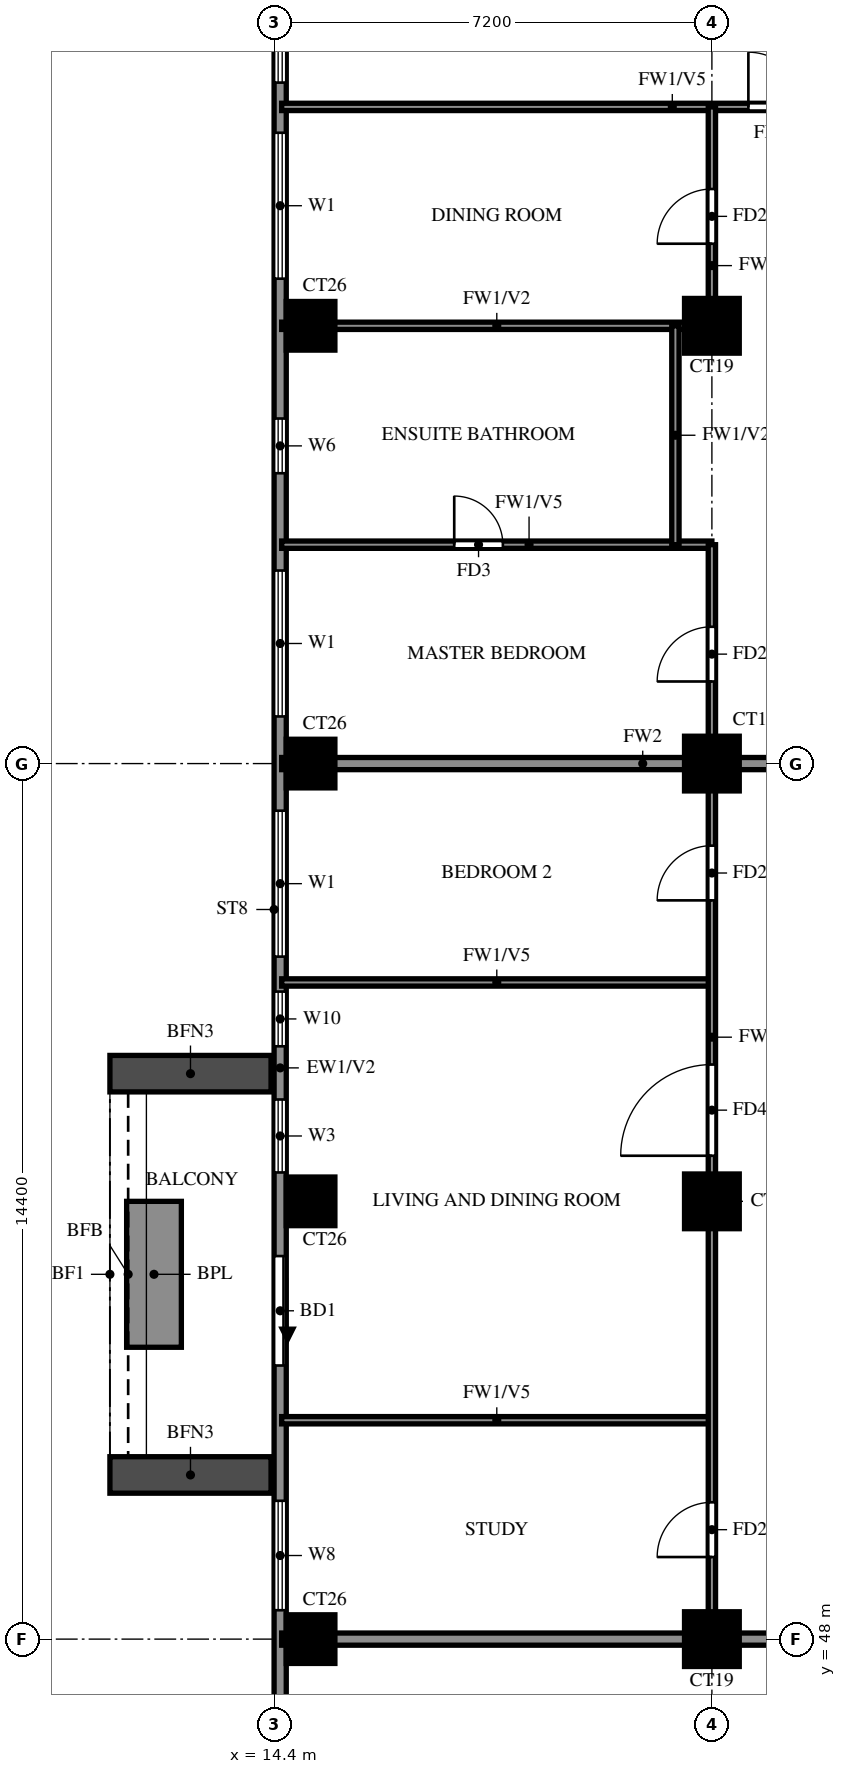
"""IFC4 building model, lengths in metres.
Left out: names, types, materials, properties, quantities, classifications, styles, units other than length and angle.
Written with IfcOpenShell. Run it as: python <this file> out.ifc"""

import sys

from ifc_helpers import new_model, si_unit, direction, frame, frame_2d, origin, origin_2d, place, context, subcontext, project, spatial, rectangle, extrude, source, transform, mapped, element, fill, save


model = new_model("IFC4")
c1 = context("Model", 3, precision=1e-05, world=origin(), true_north=direction((0.0, 1.0)))
c2 = subcontext(c1, "Body", "Model", "MODEL_VIEW")
j1 = project(units=[si_unit("LENGTHUNIT", "METRE"), si_unit("PLANEANGLEUNIT", "RADIAN")], contexts=[c1])
p1 = place(None, origin())
s1 = spatial("IfcSite", under=j1, at=p1, CompositionType="ELEMENT")
p2 = place(p1, origin())
s2 = spatial("IfcBuilding", under=s1, at=p2, CompositionType="ELEMENT")
p3 = place(p2, frame((0.0, 0.0, 199.0)))
s3 = spatial("IfcBuildingStorey", under=s2, at=p3, CompositionType="ELEMENT", Elevation=199.0)
m1 = source(origin(), c2, "Body", "SweptSolid", [
    extrude(rectangle(XDim=0.8, YDim=0.8, at=origin_2d()), origin(), (0.0, 0.0, 1.0), 3.2),
])
p4 = place(p3, frame((15.0, 48.0, 0.0), z_axis=(0.0, 0.0, 1.0), x_axis=(1.0, 0.0, 0.0)))
e1 = element("IfcColumn", 1, at=p4, inside=s3, PredefinedType="COLUMN", context=c2, shape_type="MappedRepresentation", body=[
    mapped(m1, transform((0.0, 0.0, 0.0))),
])
m2 = source(origin(), c2, "Body", "SweptSolid", [
    extrude(rectangle(XDim=0.9, YDim=0.9, at=origin_2d()), origin(), (0.0, 0.0, 1.0), 3.2),
])
p5 = place(p3, frame((21.6, 48.0, 0.0), z_axis=(0.0, 0.0, 1.0), x_axis=(1.0, 0.0, 0.0)))
e2 = element("IfcColumn", 2, at=p5, inside=s3, PredefinedType="COLUMN", context=c2, shape_type="MappedRepresentation", body=[
    mapped(m2, transform((0.0, 0.0, 0.0))),
])
p6 = place(p3, frame((15.0, 55.2, 0.0), z_axis=(0.0, 0.0, 1.0), x_axis=(1.0, 0.0, 0.0)))
e3 = element("IfcColumn", 3, at=p6, inside=s3, PredefinedType="COLUMN", context=c2, shape_type="MappedRepresentation", body=[
    mapped(m1, transform((0.0, 0.0, 0.0))),
])
p7 = place(p3, frame((21.6, 55.2, 0.0), z_axis=(0.0, 0.0, 1.0), x_axis=(1.0, 0.0, 0.0)))
e4 = element("IfcColumn", 4, at=p7, inside=s3, PredefinedType="COLUMN", context=c2, shape_type="MappedRepresentation", body=[
    mapped(m2, transform((0.0, 0.0, 0.0))),
])
p8 = place(p3, frame((15.0, 62.4, 0.0), z_axis=(0.0, 0.0, 1.0), x_axis=(1.0, 0.0, 0.0)))
e5 = element("IfcColumn", 5, at=p8, inside=s3, PredefinedType="COLUMN", context=c2, shape_type="MappedRepresentation", body=[
    mapped(m1, transform((0.0, 0.0, 0.0))),
])
p9 = place(p3, frame((21.6, 62.4, 0.0), z_axis=(0.0, 0.0, 1.0), x_axis=(1.0, 0.0, 0.0)))
e6 = element("IfcColumn", 6, at=p9, inside=s3, PredefinedType="COLUMN", context=c2, shape_type="MappedRepresentation", body=[
    mapped(m2, transform((0.0, 0.0, 0.0))),
])
p10 = place(p3, frame((15.0, 69.6, 0.0), z_axis=(0.0, 0.0, 1.0), x_axis=(1.0, 0.0, 0.0)))
e7 = element("IfcColumn", 7, at=p10, inside=s3, PredefinedType="COLUMN", context=c2, shape_type="MappedRepresentation", body=[
    mapped(m1, transform((0.0, 0.0, 0.0))),
])
p11 = place(p3, frame((21.6, 69.6, 0.0), z_axis=(0.0, 0.0, 1.0), x_axis=(1.0, 0.0, 0.0)))
e8 = element("IfcColumn", 8, at=p11, inside=s3, PredefinedType="COLUMN", context=c2, shape_type="MappedRepresentation", body=[
    mapped(m2, transform((0.0, 0.0, 0.0))),
])
p12 = place(p3, frame((14.5, 76.6, 0.0), z_axis=(0.0, 0.0, 1.0), x_axis=(0.0, -1.0, 0.0)))
e9 = element("IfcWall", 9, at=p12, inside=s3, PredefinedType="SOLIDWALL", context=c2, shape_type="SweptSolid", body=[
    extrude(rectangle(XDim=33.4, YDim=0.2, at=frame_2d((16.7, 0.0))), origin(), (0.0, 0.0, 1.0), 3.2),
])
p13 = place(p12, frame((22.3, 0.0, 0.0)))
e10 = element("IfcOpeningElement", 10, at=p13, cuts=e9, PredefinedType="OPENING", context=c2, shape_type="SweptSolid", body=[
    extrude(rectangle(XDim=1.8, YDim=2.4, at=frame_2d((0.9, 1.2))), frame((0.0, 0.11, 0.0), z_axis=(0.0, -1.0, 0.0), x_axis=(1.0, 0.0, 0.0)), (0.0, 0.0, 1.0), 0.22),
])
p14 = place(p12, frame((29.875, 0.0, 0.6)))
e11 = element("IfcOpeningElement", 11, at=p14, cuts=e9, PredefinedType="OPENING", context=c2, shape_type="SweptSolid", body=[
    extrude(rectangle(XDim=2.4, YDim=2.4, at=frame_2d((1.2, 1.2))), frame((0.0, 0.11, 0.0), z_axis=(0.0, -1.0, 0.0), x_axis=(1.0, 0.0, 0.0)), (0.0, 0.0, 1.0), 0.22),
])
p15 = place(p12, frame((26.325, 0.0, 0.6)))
e12 = element("IfcOpeningElement", 12, at=p15, cuts=e9, PredefinedType="OPENING", context=c2, shape_type="SweptSolid", body=[
    extrude(rectangle(XDim=1.8, YDim=2.4, at=frame_2d((0.9, 1.2))), frame((0.0, 0.11, 0.0), z_axis=(0.0, -1.0, 0.0), x_axis=(1.0, 0.0, 0.0)), (0.0, 0.0, 1.0), 0.22),
])
p16 = place(p12, frame((17.95, 0.0, 0.6)))
e13 = element("IfcOpeningElement", 13, at=p16, cuts=e9, PredefinedType="OPENING", context=c2, shape_type="SweptSolid", body=[
    extrude(rectangle(XDim=0.9, YDim=2.4, at=frame_2d((0.45, 1.2))), frame((0.0, 0.11, 0.0), z_axis=(0.0, -1.0, 0.0), x_axis=(1.0, 0.0, 0.0)), (0.0, 0.0, 1.0), 0.22),
])
p17 = place(p12, frame((19.725, 0.0, 0.6)))
e14 = element("IfcOpeningElement", 14, at=p17, cuts=e9, PredefinedType="OPENING", context=c2, shape_type="SweptSolid", body=[
    extrude(rectangle(XDim=1.2, YDim=2.4, at=frame_2d((0.6, 1.2))), frame((0.0, 0.11, 0.0), z_axis=(0.0, -1.0, 0.0), x_axis=(1.0, 0.0, 0.0)), (0.0, 0.0, 1.0), 0.22),
])
p18 = place(p12, frame((14.975, 0.0, 0.6)))
e15 = element("IfcOpeningElement", 15, at=p18, cuts=e9, PredefinedType="OPENING", context=c2, shape_type="SweptSolid", body=[
    extrude(rectangle(XDim=2.4, YDim=2.4, at=frame_2d((1.2, 1.2))), frame((0.0, 0.11, 0.0), z_axis=(0.0, -1.0, 0.0), x_axis=(1.0, 0.0, 0.0)), (0.0, 0.0, 1.0), 0.22),
])
p19 = place(p12, frame((11.025, 0.0, 0.6)))
e16 = element("IfcOpeningElement", 16, at=p19, cuts=e9, PredefinedType="OPENING", context=c2, shape_type="SweptSolid", body=[
    extrude(rectangle(XDim=2.4, YDim=2.4, at=frame_2d((1.2, 1.2))), frame((0.0, 0.11, 0.0), z_axis=(0.0, -1.0, 0.0), x_axis=(1.0, 0.0, 0.0)), (0.0, 0.0, 1.0), 0.22),
])
p20 = place(p12, frame((8.525, 0.0, 1.5)))
e17 = element("IfcOpeningElement", 17, at=p20, cuts=e9, PredefinedType="OPENING", context=c2, shape_type="SweptSolid", body=[
    extrude(rectangle(XDim=0.9, YDim=0.9, at=frame_2d((0.45, 0.45))), frame((0.0, 0.11, 0.0), z_axis=(0.0, -1.0, 0.0), x_axis=(1.0, 0.0, 0.0)), (0.0, 0.0, 1.0), 0.22),
])
p21 = place(p12, frame((3.825, 0.0, 0.6)))
e18 = element("IfcOpeningElement", 18, at=p21, cuts=e9, PredefinedType="OPENING", context=c2, shape_type="SweptSolid", body=[
    extrude(rectangle(XDim=2.4, YDim=2.4, at=frame_2d((1.2, 1.2))), frame((0.0, 0.11, 0.0), z_axis=(0.0, -1.0, 0.0), x_axis=(1.0, 0.0, 0.0)), (0.0, 0.0, 1.0), 0.22),
])
p22 = place(p12, frame((0.6, 0.0, 0.6)))
e19 = element("IfcOpeningElement", 19, at=p22, cuts=e9, PredefinedType="OPENING", context=c2, shape_type="SweptSolid", body=[
    extrude(rectangle(XDim=2.4, YDim=2.4, at=frame_2d((1.2, 1.2))), frame((0.0, 0.11, 0.0), z_axis=(0.0, -1.0, 0.0), x_axis=(1.0, 0.0, 0.0)), (0.0, 0.0, 1.0), 0.22),
])
for number, where, z_axis, x_axis in (
    (20, (14.35, 57.3, 0.0), (0.0, 0.0, 1.0), (-1.0, 0.0, 0.0)),
    (21, (14.35, 50.7, 0.0), (0.0, 0.0, 1.0), (-1.0, 0.0, 0.0)),
):
    element("IfcWall", number, at=place(p3, frame(where, z_axis=z_axis, x_axis=x_axis)), inside=s3, PredefinedType="SOLIDWALL", context=c2, shape_type="SweptSolid", body=[
        extrude(rectangle(XDim=2.65, YDim=0.6, at=frame_2d((1.325, 0.0))), origin(), (0.0, 0.0, 1.0), 2.85),
    ])
p23 = place(p3, frame((12.425, 55.2, 0.0), z_axis=(0.0, 0.0, 1.0), x_axis=(0.0, -1.0, 0.0)))
e22 = element("IfcWall", 22, at=p23, inside=s3, PredefinedType="SOLIDWALL", context=c2, shape_type="SweptSolid", body=[
    extrude(rectangle(XDim=2.4, YDim=0.9, at=frame_2d((1.2, 0.0))), origin(), (0.0, 0.0, 1.0), 0.9),
])
p24 = place(p3, frame((14.525, 48.0, 0.0), z_axis=(0.0, 0.0, 1.0), x_axis=(1.0, 0.0, 0.0)))
e23 = element("IfcWall", 23, at=p24, inside=s3, PredefinedType="SOLIDWALL", context=c2, shape_type="SweptSolid", body=[
    extrude(rectangle(XDim=19.075, YDim=0.2, at=frame_2d((9.538, 0.0))), origin(), (0.0, 0.0, 1.0), 3.2),
])
p25 = place(p3, frame((14.525, 62.4, 0.0), z_axis=(0.0, 0.0, 1.0), x_axis=(1.0, 0.0, 0.0)))
e24 = element("IfcWall", 24, at=p25, inside=s3, PredefinedType="SOLIDWALL", context=c2, shape_type="SweptSolid", body=[
    extrude(rectangle(XDim=11.875, YDim=0.2, at=frame_2d((5.938, 0.0))), origin(), (0.0, 0.0, 1.0), 3.2),
])
for number, where, z_axis, x_axis in (
    (25, (14.525, 51.6, 0.0), (0.0, 0.0, 1.0), (1.0, 0.0, 0.0)),
    (26, (14.525, 58.8, 0.0), (0.0, 0.0, 1.0), (1.0, 0.0, 0.0)),
):
    element("IfcWall", number, at=place(p3, frame(where, z_axis=z_axis, x_axis=x_axis)), inside=s3, PredefinedType="PARTITIONING", context=c2, shape_type="SweptSolid", body=[
        extrude(rectangle(XDim=7.075, YDim=0.12, at=frame_2d((3.538, 0.0))), origin(), (0.0, 0.0, 1.0), 2.3),
    ])
p26 = place(p3, frame((14.525, 66.0, 0.0), z_axis=(0.0, 0.0, 1.0), x_axis=(1.0, 0.0, 0.0)))
e27 = element("IfcWall", 27, at=p26, inside=s3, PredefinedType="PARTITIONING", context=c2, shape_type="SweptSolid", body=[
    extrude(rectangle(XDim=7.075, YDim=0.12, at=frame_2d((3.538, 0.0))), origin(), (0.0, 0.0, 1.0), 2.3),
])
p27 = place(p26, frame((2.837, 0.0, 0.0)))
e28 = element("IfcOpeningElement", 28, at=p27, cuts=e27, PredefinedType="OPENING", context=c2, shape_type="SweptSolid", body=[
    extrude(rectangle(XDim=0.8, YDim=2.1, at=frame_2d((0.4, 1.05))), frame((0.0, 0.07, 0.0), z_axis=(0.0, -1.0, 0.0), x_axis=(1.0, 0.0, 0.0)), (0.0, 0.0, 1.0), 0.14),
])
p28 = place(p3, frame((14.525, 69.6, 0.0), z_axis=(0.0, 0.0, 1.0), x_axis=(1.0, 0.0, 0.0)))
e29 = element("IfcWall", 29, at=p28, inside=s3, PredefinedType="PARTITIONING", context=c2, shape_type="SweptSolid", body=[
    extrude(rectangle(XDim=7.075, YDim=0.12, at=frame_2d((3.538, 0.0))), origin(), (0.0, 0.0, 1.0), 3.2),
])
p29 = place(p3, frame((14.525, 73.2, 0.0), z_axis=(0.0, 0.0, 1.0), x_axis=(1.0, 0.0, 0.0)))
e30 = element("IfcWall", 30, at=p29, inside=s3, PredefinedType="PARTITIONING", context=c2, shape_type="SweptSolid", body=[
    extrude(rectangle(XDim=14.275, YDim=0.12, at=frame_2d((7.138, 0.0))), origin(), (0.0, 0.0, 1.0), 2.3),
])
p30 = place(p29, frame((7.675, 0.0, 0.0)))
e31 = element("IfcOpeningElement", 31, at=p30, cuts=e30, PredefinedType="OPENING", context=c2, shape_type="SweptSolid", body=[
    extrude(rectangle(XDim=0.9, YDim=2.1, at=frame_2d((0.45, 1.05))), frame((0.0, 0.07, 0.0), z_axis=(0.0, -1.0, 0.0), x_axis=(1.0, 0.0, 0.0)), (0.0, 0.0, 1.0), 0.14),
])
p31 = place(p3, frame((21.0, 66.0, 0.0), z_axis=(0.0, 0.0, 1.0), x_axis=(0.0, 1.0, 0.0)))
e32 = element("IfcWall", 32, at=p31, inside=s3, PredefinedType="PARTITIONING", context=c2, shape_type="SweptSolid", body=[
    extrude(rectangle(XDim=3.6, YDim=0.12, at=frame_2d((1.8, 0.0))), origin(), (0.0, 0.0, 1.0), 3.2),
])
p32 = place(p3, frame((21.6, 48.0, 0.0), z_axis=(0.0, 0.0, 1.0), x_axis=(0.0, 1.0, 0.0)))
e33 = element("IfcWall", 33, at=p32, inside=s3, PredefinedType="PARTITIONING", context=c2, shape_type="SweptSolid", body=[
    extrude(rectangle(XDim=18.0, YDim=0.12, at=frame_2d((9.0, 0.0))), origin(), (0.0, 0.0, 1.0), 3.2),
])
p33 = place(p32, frame((1.35, 0.0, 0.0)))
e34 = element("IfcOpeningElement", 34, at=p33, cuts=e33, PredefinedType="OPENING", context=c2, shape_type="SweptSolid", body=[
    extrude(rectangle(XDim=0.9, YDim=2.1, at=frame_2d((0.45, 1.05))), frame((0.0, 0.07, 0.0), z_axis=(0.0, -1.0, 0.0), x_axis=(1.0, 0.0, 0.0)), (0.0, 0.0, 1.0), 0.14),
])
p34 = place(p32, frame((7.95, 0.0, 0.0)))
e35 = element("IfcOpeningElement", 35, at=p34, cuts=e33, PredefinedType="OPENING", context=c2, shape_type="SweptSolid", body=[
    extrude(rectangle(XDim=1.5, YDim=2.1, at=frame_2d((0.75, 1.05))), frame((0.0, 0.07, 0.0), z_axis=(0.0, -1.0, 0.0), x_axis=(1.0, 0.0, 0.0)), (0.0, 0.0, 1.0), 0.14),
])
p35 = place(p32, frame((12.15, 0.0, 0.0)))
e36 = element("IfcOpeningElement", 36, at=p35, cuts=e33, PredefinedType="OPENING", context=c2, shape_type="SweptSolid", body=[
    extrude(rectangle(XDim=0.9, YDim=2.1, at=frame_2d((0.45, 1.05))), frame((0.0, 0.07, 0.0), z_axis=(0.0, -1.0, 0.0), x_axis=(1.0, 0.0, 0.0)), (0.0, 0.0, 1.0), 0.14),
])
p36 = place(p32, frame((15.75, 0.0, 0.0)))
e37 = element("IfcOpeningElement", 37, at=p36, cuts=e33, PredefinedType="OPENING", context=c2, shape_type="SweptSolid", body=[
    extrude(rectangle(XDim=0.9, YDim=2.1, at=frame_2d((0.45, 1.05))), frame((0.0, 0.07, 0.0), z_axis=(0.0, -1.0, 0.0), x_axis=(1.0, 0.0, 0.0)), (0.0, 0.0, 1.0), 0.14),
])
p37 = place(p3, frame((21.6, 69.6, 0.0), z_axis=(0.0, 0.0, 1.0), x_axis=(0.0, 1.0, 0.0)))
e38 = element("IfcWall", 38, at=p37, inside=s3, PredefinedType="PARTITIONING", context=c2, shape_type="SweptSolid", body=[
    extrude(rectangle(XDim=3.6, YDim=0.12, at=frame_2d((1.8, 0.0))), origin(), (0.0, 0.0, 1.0), 3.2),
])
p38 = place(p37, frame((1.35, 0.0, 0.0)))
e39 = element("IfcOpeningElement", 39, at=p38, cuts=e38, PredefinedType="OPENING", context=c2, shape_type="SweptSolid", body=[
    extrude(rectangle(XDim=0.9, YDim=2.1, at=frame_2d((0.45, 1.05))), frame((0.0, 0.07, 0.0), z_axis=(0.0, -1.0, 0.0), x_axis=(1.0, 0.0, 0.0)), (0.0, 0.0, 1.0), 0.14),
])
p39 = place(p13, origin())
e40 = element("IfcDoor", 40, at=p39, inside=s3, OperationType="DOUBLE_DOOR_SLIDING", PredefinedType="DOOR", context=c2, shape_type="SweptSolid", body=[
    extrude(rectangle(XDim=1.8, YDim=2.4, at=frame_2d((0.9, 1.2))), frame((0.0, 0.025, 0.0), z_axis=(0.0, -1.0, 0.0), x_axis=(1.0, 0.0, 0.0)), (0.0, 0.0, 1.0), 0.05),
])
fill(e10, e40)
p40 = place(p15, origin())
e41 = element("IfcWindow", 41, at=p40, inside=s3, PartitioningType="DOUBLE_PANEL_VERTICAL", PredefinedType="WINDOW", context=c2, shape_type="SweptSolid", body=[
    extrude(rectangle(XDim=1.8, YDim=2.4, at=frame_2d((0.9, 1.2))), frame((0.0, 0.03, 0.0), z_axis=(0.0, -1.0, 0.0), x_axis=(1.0, 0.0, 0.0)), (0.0, 0.0, 1.0), 0.06),
])
fill(e12, e41)
p41 = place(p16, origin())
e42 = element("IfcWindow", 42, at=p41, inside=s3, PartitioningType="SINGLE_PANEL", PredefinedType="WINDOW", context=c2, shape_type="SweptSolid", body=[
    extrude(rectangle(XDim=0.9, YDim=2.4, at=frame_2d((0.45, 1.2))), frame((0.0, 0.03, 0.0), z_axis=(0.0, -1.0, 0.0), x_axis=(1.0, 0.0, 0.0)), (0.0, 0.0, 1.0), 0.06),
])
fill(e13, e42)
p42 = place(p17, origin())
e43 = element("IfcWindow", 43, at=p42, inside=s3, PartitioningType="SINGLE_PANEL", PredefinedType="WINDOW", context=c2, shape_type="SweptSolid", body=[
    extrude(rectangle(XDim=1.2, YDim=2.4, at=frame_2d((0.6, 1.2))), frame((0.0, 0.03, 0.0), z_axis=(0.0, -1.0, 0.0), x_axis=(1.0, 0.0, 0.0)), (0.0, 0.0, 1.0), 0.06),
])
fill(e14, e43)
p43 = place(p18, origin())
e44 = element("IfcWindow", 44, at=p43, inside=s3, PartitioningType="DOUBLE_PANEL_VERTICAL", PredefinedType="WINDOW", context=c2, shape_type="SweptSolid", body=[
    extrude(rectangle(XDim=2.4, YDim=2.4, at=frame_2d((1.2, 1.2))), frame((0.0, 0.03, 0.0), z_axis=(0.0, -1.0, 0.0), x_axis=(1.0, 0.0, 0.0)), (0.0, 0.0, 1.0), 0.06),
])
fill(e15, e44)
p44 = place(p19, origin())
e45 = element("IfcWindow", 45, at=p44, inside=s3, PartitioningType="DOUBLE_PANEL_VERTICAL", PredefinedType="WINDOW", context=c2, shape_type="SweptSolid", body=[
    extrude(rectangle(XDim=2.4, YDim=2.4, at=frame_2d((1.2, 1.2))), frame((0.0, 0.03, 0.0), z_axis=(0.0, -1.0, 0.0), x_axis=(1.0, 0.0, 0.0)), (0.0, 0.0, 1.0), 0.06),
])
fill(e16, e45)
p45 = place(p20, origin())
e46 = element("IfcWindow", 46, at=p45, inside=s3, PartitioningType="SINGLE_PANEL", PredefinedType="WINDOW", context=c2, shape_type="SweptSolid", body=[
    extrude(rectangle(XDim=0.9, YDim=0.9, at=frame_2d((0.45, 0.45))), frame((0.0, 0.03, 0.0), z_axis=(0.0, -1.0, 0.0), x_axis=(1.0, 0.0, 0.0)), (0.0, 0.0, 1.0), 0.06),
])
fill(e17, e46)
p46 = place(p21, origin())
e47 = element("IfcWindow", 47, at=p46, inside=s3, PartitioningType="DOUBLE_PANEL_VERTICAL", PredefinedType="WINDOW", context=c2, shape_type="SweptSolid", body=[
    extrude(rectangle(XDim=2.4, YDim=2.4, at=frame_2d((1.2, 1.2))), frame((0.0, 0.03, 0.0), z_axis=(0.0, -1.0, 0.0), x_axis=(1.0, 0.0, 0.0)), (0.0, 0.0, 1.0), 0.06),
])
fill(e18, e47)
p47 = place(p22, origin())
e48 = element("IfcWindow", 48, at=p47, inside=s3, PartitioningType="DOUBLE_PANEL_VERTICAL", PredefinedType="WINDOW", context=c2, shape_type="SweptSolid", body=[
    extrude(rectangle(XDim=2.4, YDim=2.4, at=frame_2d((1.2, 1.2))), frame((0.0, 0.03, 0.0), z_axis=(0.0, -1.0, 0.0), x_axis=(1.0, 0.0, 0.0)), (0.0, 0.0, 1.0), 0.06),
])
fill(e19, e48)
p48 = place(p33, origin())
e49 = element("IfcDoor", 49, at=p48, inside=s3, OperationType="SINGLE_SWING_RIGHT", PredefinedType="DOOR", context=c2, shape_type="SweptSolid", body=[
    extrude(rectangle(XDim=0.9, YDim=2.1, at=frame_2d((0.45, 1.05))), frame((0.0, 0.025, 0.0), z_axis=(0.0, -1.0, 0.0), x_axis=(1.0, 0.0, 0.0)), (0.0, 0.0, 1.0), 0.05),
])
fill(e34, e49)
p49 = place(p34, origin())
e50 = element("IfcDoor", 50, at=p49, inside=s3, OperationType="SINGLE_SWING_RIGHT", PredefinedType="DOOR", context=c2, shape_type="SweptSolid", body=[
    extrude(rectangle(XDim=1.5, YDim=2.1, at=frame_2d((0.75, 1.05))), frame((0.0, 0.025, 0.0), z_axis=(0.0, -1.0, 0.0), x_axis=(1.0, 0.0, 0.0)), (0.0, 0.0, 1.0), 0.05),
])
fill(e35, e50)
p50 = place(p35, origin())
e51 = element("IfcDoor", 51, at=p50, inside=s3, OperationType="SINGLE_SWING_LEFT", PredefinedType="DOOR", context=c2, shape_type="SweptSolid", body=[
    extrude(rectangle(XDim=0.9, YDim=2.1, at=frame_2d((0.45, 1.05))), frame((0.0, 0.025, 0.0), z_axis=(0.0, -1.0, 0.0), x_axis=(1.0, 0.0, 0.0)), (0.0, 0.0, 1.0), 0.05),
])
fill(e36, e51)
p51 = place(p36, origin())
e52 = element("IfcDoor", 52, at=p51, inside=s3, OperationType="SINGLE_SWING_RIGHT", PredefinedType="DOOR", context=c2, shape_type="SweptSolid", body=[
    extrude(rectangle(XDim=0.9, YDim=2.1, at=frame_2d((0.45, 1.05))), frame((0.0, 0.025, 0.0), z_axis=(0.0, -1.0, 0.0), x_axis=(1.0, 0.0, 0.0)), (0.0, 0.0, 1.0), 0.05),
])
fill(e37, e52)
p52 = place(p27, origin())
e53 = element("IfcDoor", 53, at=p52, inside=s3, OperationType="SINGLE_SWING_LEFT", PredefinedType="DOOR", context=c2, shape_type="SweptSolid", body=[
    extrude(rectangle(XDim=0.8, YDim=2.1, at=frame_2d((0.4, 1.05))), frame((0.0, 0.025, 0.0), z_axis=(0.0, -1.0, 0.0), x_axis=(1.0, 0.0, 0.0)), (0.0, 0.0, 1.0), 0.05),
])
fill(e28, e53)
p53 = place(p38, origin())
e54 = element("IfcDoor", 54, at=p53, inside=s3, OperationType="SINGLE_SWING_LEFT", PredefinedType="DOOR", context=c2, shape_type="SweptSolid", body=[
    extrude(rectangle(XDim=0.9, YDim=2.1, at=frame_2d((0.45, 1.05))), frame((0.0, 0.025, 0.0), z_axis=(0.0, -1.0, 0.0), x_axis=(1.0, 0.0, 0.0)), (0.0, 0.0, 1.0), 0.05),
])
fill(e39, e54)
p54 = place(p30, origin())
e55 = element("IfcDoor", 55, at=p54, inside=s3, OperationType="SINGLE_SWING_RIGHT", PredefinedType="DOOR", context=c2, shape_type="SweptSolid", body=[
    extrude(rectangle(XDim=0.9, YDim=2.1, at=frame_2d((0.45, 1.05))), frame((0.0, 0.025, 0.0), z_axis=(0.0, -1.0, 0.0), x_axis=(1.0, 0.0, 0.0)), (0.0, 0.0, 1.0), 0.05),
])
fill(e31, e55)
save(model, sys.argv[1])
